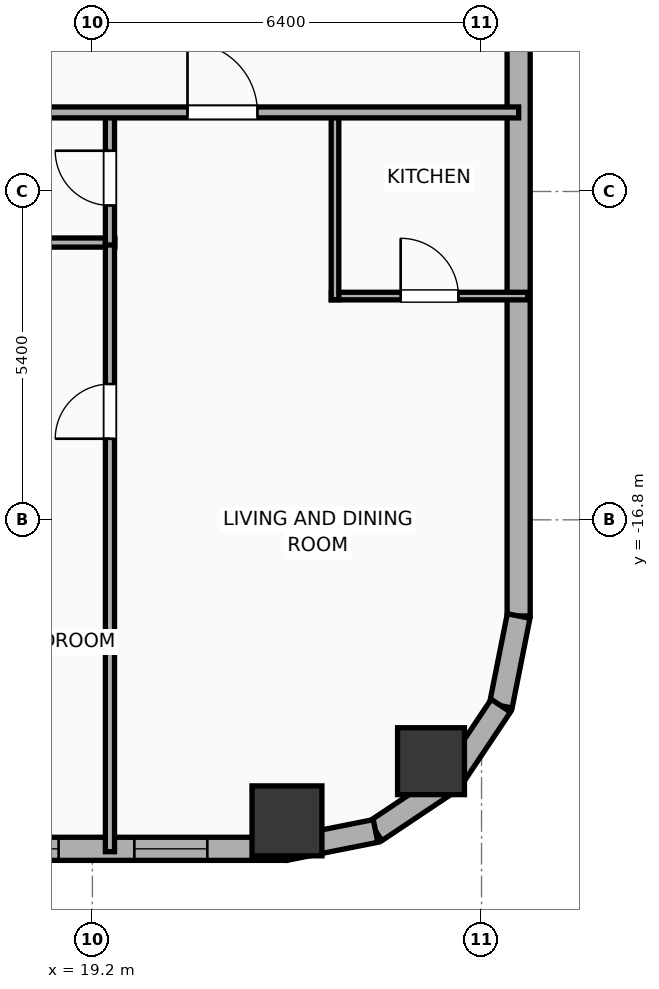
"""IFC4 building model, lengths in metres.
Left out: names, types, materials, properties, quantities, classifications, styles, units other than length and angle.
Written with IfcOpenShell. Run it as: python <this file> out.ifc"""

import sys

from ifc_helpers import new_model, si_unit, direction, frame, frame_2d, origin, origin_2d, place, context, subcontext, project, spatial, rectangle, hollow_rectangle, hollow_circle, extrude, element, fill, save


model = new_model("IFC4")
c1 = context("Model", 3, precision=1e-05, world=origin(), true_north=direction((0.0, 1.0)))
c2 = subcontext(c1, "Body", "Model", "MODEL_VIEW")
j1 = project(units=[si_unit("LENGTHUNIT", "METRE"), si_unit("PLANEANGLEUNIT", "RADIAN")], contexts=[c1])
p1 = place(None, origin())
s1 = spatial("IfcSite", under=j1, at=p1, CompositionType="ELEMENT")
p2 = place(p1, origin())
s2 = spatial("IfcBuilding", under=s1, at=p2, CompositionType="ELEMENT")
p3 = place(p2, frame((0.0, 0.0, 37.7)))
s3 = spatial("IfcBuildingStorey", under=s2, at=p3, CompositionType="ELEMENT", Elevation=37.7)
p4 = place(p3, frame((22.4, -21.75, 0.0), z_axis=(0.0, 0.0, 1.0), x_axis=(1.0, 0.0, 0.0)))
e1 = element("IfcColumn", 1, at=p4, inside=s3, PredefinedType="COLUMN", context=c2, shape_type="SweptSolid", body=[
    extrude(hollow_rectangle(XDim=1.15, YDim=1.15, WallThickness=0.04, at=origin_2d()), origin(), (0.0, 0.0, 1.0), 3.9),
])
p5 = place(p3, frame((24.769, -20.769, 0.0), z_axis=(0.0, 0.0, 1.0), x_axis=(1.0, 0.0, 0.0)))
e2 = element("IfcColumn", 2, at=p5, inside=s3, PredefinedType="COLUMN", context=c2, shape_type="SweptSolid", body=[
    extrude(hollow_circle(Radius=0.55, WallThickness=0.036, at=origin_2d()), origin(), (0.0, 0.0, 1.0), 3.9),
])
p6 = place(p3, frame((22.381, -22.21, 0.0), z_axis=(0.0, 0.0, 1.0), x_axis=(-1.0, 0.0, 0.0)))
e3 = element("IfcWall", 3, at=p6, inside=s3, PredefinedType="ELEMENTEDWALL", context=c2, shape_type="SweptSolid", body=[
    extrude(rectangle(XDim=51.963, YDim=0.38, at=frame_2d((25.981, 0.0))), origin(), (0.0, 0.0, 1.0), 3.65),
])
p7 = place(p6, frame((42.952, 0.0, 0.75)))
e4 = element("IfcOpeningElement", 4, at=p7, cuts=e3, PredefinedType="OPENING", context=c2, shape_type="SweptSolid", body=[
    extrude(rectangle(XDim=2.4, YDim=2.1, at=frame_2d((1.2, 1.05))), frame((0.0, 0.2, 0.0), z_axis=(0.0, -1.0, 0.0), x_axis=(1.0, 0.0, 0.0)), (0.0, 0.0, 1.0), 0.4),
])
p8 = place(p6, frame((49.847, 0.0, 0.75)))
e5 = element("IfcOpeningElement", 5, at=p8, cuts=e3, PredefinedType="OPENING", context=c2, shape_type="SweptSolid", body=[
    extrude(rectangle(XDim=1.2, YDim=2.05, at=frame_2d((0.6, 1.025))), frame((0.0, 0.2, 0.0), z_axis=(0.0, -1.0, 0.0), x_axis=(1.0, 0.0, 0.0)), (0.0, 0.0, 1.0), 0.4),
])
p9 = place(p6, frame((47.445, 0.0, 0.75)))
e6 = element("IfcOpeningElement", 6, at=p9, cuts=e3, PredefinedType="OPENING", context=c2, shape_type="SweptSolid", body=[
    extrude(rectangle(XDim=1.2, YDim=2.05, at=frame_2d((0.6, 1.025))), frame((0.0, 0.2, 0.0), z_axis=(0.0, -1.0, 0.0), x_axis=(1.0, 0.0, 0.0)), (0.0, 0.0, 1.0), 0.4),
])
p10 = place(p6, frame((39.526, 0.0, 0.75)))
e7 = element("IfcOpeningElement", 7, at=p10, cuts=e3, PredefinedType="OPENING", context=c2, shape_type="SweptSolid", body=[
    extrude(rectangle(XDim=1.2, YDim=2.05, at=frame_2d((0.6, 1.025))), frame((0.0, 0.2, 0.0), z_axis=(0.0, -1.0, 0.0), x_axis=(1.0, 0.0, 0.0)), (0.0, 0.0, 1.0), 0.4),
])
p11 = place(p6, frame((33.018, 0.0, 0.75)))
e8 = element("IfcOpeningElement", 8, at=p11, cuts=e3, PredefinedType="OPENING", context=c2, shape_type="SweptSolid", body=[
    extrude(rectangle(XDim=1.2, YDim=2.05, at=frame_2d((0.6, 1.025))), frame((0.0, 0.2, 0.0), z_axis=(0.0, -1.0, 0.0), x_axis=(1.0, 0.0, 0.0)), (0.0, 0.0, 1.0), 0.4),
])
p12 = place(p6, frame((36.813, 0.0, 0.75)))
e9 = element("IfcOpeningElement", 9, at=p12, cuts=e3, PredefinedType="OPENING", context=c2, shape_type="SweptSolid", body=[
    extrude(rectangle(XDim=1.2, YDim=2.05, at=frame_2d((0.6, 1.025))), frame((0.0, 0.2, 0.0), z_axis=(0.0, -1.0, 0.0), x_axis=(1.0, 0.0, 0.0)), (0.0, 0.0, 1.0), 0.4),
])
p13 = place(p6, frame((28.886, 0.0, 0.75)))
e10 = element("IfcOpeningElement", 10, at=p13, cuts=e3, PredefinedType="OPENING", context=c2, shape_type="SweptSolid", body=[
    extrude(rectangle(XDim=1.2, YDim=2.05, at=frame_2d((0.6, 1.025))), frame((0.0, 0.2, 0.0), z_axis=(0.0, -1.0, 0.0), x_axis=(1.0, 0.0, 0.0)), (0.0, 0.0, 1.0), 0.4),
])
p14 = place(p6, frame((23.306, 0.0, 0.75)))
e11 = element("IfcOpeningElement", 11, at=p14, cuts=e3, PredefinedType="OPENING", context=c2, shape_type="SweptSolid", body=[
    extrude(rectangle(XDim=1.2, YDim=2.05, at=frame_2d((0.6, 1.025))), frame((0.0, 0.2, 0.0), z_axis=(0.0, -1.0, 0.0), x_axis=(1.0, 0.0, 0.0)), (0.0, 0.0, 1.0), 0.4),
])
p15 = place(p6, frame((26.056, 0.0, 0.75)))
e12 = element("IfcOpeningElement", 12, at=p15, cuts=e3, PredefinedType="OPENING", context=c2, shape_type="SweptSolid", body=[
    extrude(rectangle(XDim=1.2, YDim=2.05, at=frame_2d((0.6, 1.025))), frame((0.0, 0.2, 0.0), z_axis=(0.0, -1.0, 0.0), x_axis=(1.0, 0.0, 0.0)), (0.0, 0.0, 1.0), 0.4),
])
p16 = place(p6, frame((18.811, 0.0, 0.75)))
e13 = element("IfcOpeningElement", 13, at=p16, cuts=e3, PredefinedType="OPENING", context=c2, shape_type="SweptSolid", body=[
    extrude(rectangle(XDim=1.2, YDim=2.05, at=frame_2d((0.6, 1.025))), frame((0.0, 0.2, 0.0), z_axis=(0.0, -1.0, 0.0), x_axis=(1.0, 0.0, 0.0)), (0.0, 0.0, 1.0), 0.4),
])
p17 = place(p6, frame((14.602, 0.0, 0.75)))
e14 = element("IfcOpeningElement", 14, at=p17, cuts=e3, PredefinedType="OPENING", context=c2, shape_type="SweptSolid", body=[
    extrude(rectangle(XDim=1.2, YDim=2.05, at=frame_2d((0.6, 1.025))), frame((0.0, 0.2, 0.0), z_axis=(0.0, -1.0, 0.0), x_axis=(1.0, 0.0, 0.0)), (0.0, 0.0, 1.0), 0.4),
])
p18 = place(p6, frame((11.852, 0.0, 0.75)))
e15 = element("IfcOpeningElement", 15, at=p18, cuts=e3, PredefinedType="OPENING", context=c2, shape_type="SweptSolid", body=[
    extrude(rectangle(XDim=1.2, YDim=2.05, at=frame_2d((0.6, 1.025))), frame((0.0, 0.2, 0.0), z_axis=(0.0, -1.0, 0.0), x_axis=(1.0, 0.0, 0.0)), (0.0, 0.0, 1.0), 0.4),
])
p19 = place(p6, frame((8.316, 0.0, 0.75)))
e16 = element("IfcOpeningElement", 16, at=p19, cuts=e3, PredefinedType="OPENING", context=c2, shape_type="SweptSolid", body=[
    extrude(rectangle(XDim=1.2, YDim=2.05, at=frame_2d((0.6, 1.025))), frame((0.0, 0.2, 0.0), z_axis=(0.0, -1.0, 0.0), x_axis=(1.0, 0.0, 0.0)), (0.0, 0.0, 1.0), 0.4),
])
p20 = place(p6, frame((6.286, 0.0, 0.75)))
e17 = element("IfcOpeningElement", 17, at=p20, cuts=e3, PredefinedType="OPENING", context=c2, shape_type="SweptSolid", body=[
    extrude(rectangle(XDim=1.2, YDim=2.05, at=frame_2d((0.6, 1.025))), frame((0.0, 0.2, 0.0), z_axis=(0.0, -1.0, 0.0), x_axis=(1.0, 0.0, 0.0)), (0.0, 0.0, 1.0), 0.4),
])
p21 = place(p6, frame((3.737, 0.0, 0.75)))
e18 = element("IfcOpeningElement", 18, at=p21, cuts=e3, PredefinedType="OPENING", context=c2, shape_type="SweptSolid", body=[
    extrude(rectangle(XDim=1.2, YDim=2.05, at=frame_2d((0.6, 1.025))), frame((0.0, 0.2, 0.0), z_axis=(0.0, -1.0, 0.0), x_axis=(1.0, 0.0, 0.0)), (0.0, 0.0, 1.0), 0.4),
])
p22 = place(p6, frame((1.291, 0.0, 0.75)))
e19 = element("IfcOpeningElement", 19, at=p22, cuts=e3, PredefinedType="OPENING", context=c2, shape_type="SweptSolid", body=[
    extrude(rectangle(XDim=1.2, YDim=2.05, at=frame_2d((0.6, 1.025))), frame((0.0, 0.2, 0.0), z_axis=(0.0, -1.0, 0.0), x_axis=(1.0, 0.0, 0.0)), (0.0, 0.0, 1.0), 0.4),
])
p23 = place(p3, frame((26.21, 18.381, 0.0), z_axis=(0.0, 0.0, 1.0), x_axis=(0.0, -1.0, 0.0)))
e20 = element("IfcWall", 20, at=p23, inside=s3, PredefinedType="ELEMENTEDWALL", context=c2, shape_type="SweptSolid", body=[
    extrude(rectangle(XDim=36.763, YDim=0.38, at=frame_2d((18.381, 0.0))), origin(), (0.0, 0.0, 1.0), 3.65),
])
p24 = place(p3, frame((26.21, -18.381, 0.0), z_axis=(0.0, 0.0, 1.0), x_axis=(-0.195086038585, -0.980786132421, 0.0)))
e21 = element("IfcWall", 21, at=p24, inside=s3, PredefinedType="ELEMENTEDWALL", context=c2, shape_type="SweptSolid", body=[
    extrude(rectangle(XDim=1.504, YDim=0.38, at=frame_2d((0.752, 0.0))), origin(), (0.0, 0.0, 1.0), 3.65),
])
for number, where, z_axis, x_axis in (
    (22, (25.917, -19.857, 0.0), (0.0, 0.0, 1.0), (-0.556, -0.831, 0.0)),
    (23, (25.091, -21.091, 0.0), (0.0, 0.0, 1.0), (-0.831, -0.556, 0.0)),
):
    element("IfcWall", number, at=place(p3, frame(where, z_axis=z_axis, x_axis=x_axis)), inside=s3, PredefinedType="ELEMENTEDWALL", context=c2, shape_type="SweptSolid", body=[
        extrude(rectangle(XDim=1.485, YDim=0.38, at=frame_2d((0.743, 0.0))), origin(), (0.0, 0.0, 1.0), 3.65),
    ])
p25 = place(p3, frame((23.857, -21.917, 0.0), z_axis=(0.0, 0.0, 1.0), x_axis=(-0.980786132421, -0.195086038585, 0.0)))
e24 = element("IfcWall", 24, at=p25, inside=s3, PredefinedType="ELEMENTEDWALL", context=c2, shape_type="SweptSolid", body=[
    extrude(rectangle(XDim=1.504, YDim=0.38, at=frame_2d((0.752, 0.0))), origin(), (0.0, 0.0, 1.0), 3.65),
])
p26 = place(p3, frame((16.34, -12.24, 0.0), z_axis=(0.0, 0.0, 1.0), x_axis=(1.0, 0.0, 0.0)))
e25 = element("IfcWall", 25, at=p26, inside=s3, PredefinedType="PLUMBINGWALL", context=c2, shape_type="SweptSolid", body=[
    extrude(rectangle(XDim=3.229, YDim=0.15, at=frame_2d((1.615, 0.0))), origin(), (0.0, 0.0, 1.0), 3.65),
])
p27 = place(p3, frame((19.489, -22.258, 0.0), z_axis=(0.0, 0.0, 1.0), x_axis=(0.0, 1.0, 0.0)))
e26 = element("IfcWall", 26, at=p27, inside=s3, PredefinedType="PLUMBINGWALL", context=c2, shape_type="SweptSolid", body=[
    extrude(rectangle(XDim=10.058, YDim=0.15, at=frame_2d((5.029, 0.0))), origin(), (0.0, 0.0, 1.0), 3.65),
])
p28 = place(p27, frame((6.792, 0.0, 0.0)))
e27 = element("IfcOpeningElement", 27, at=p28, cuts=e26, PredefinedType="OPENING", context=c2, shape_type="SweptSolid", body=[
    extrude(rectangle(XDim=0.9, YDim=2.05, at=frame_2d((0.45, 1.025))), frame((0.0, 0.085, 0.0), z_axis=(0.0, -1.0, 0.0), x_axis=(1.0, 0.0, 0.0)), (0.0, 0.0, 1.0), 0.17),
])
p29 = place(p3, frame((19.489, -12.28, 0.0), z_axis=(0.0, 0.0, 1.0), x_axis=(0.0, 1.0, 0.0)))
e28 = element("IfcWall", 28, at=p29, inside=s3, PredefinedType="PLUMBINGWALL", context=c2, shape_type="SweptSolid", body=[
    extrude(rectangle(XDim=2.2, YDim=0.15, at=frame_2d((1.1, 0.0))), origin(), (0.0, 0.0, 1.0), 3.65),
])
p30 = place(p29, frame((0.65, 0.0, 0.0)))
e29 = element("IfcOpeningElement", 29, at=p30, cuts=e28, PredefinedType="OPENING", context=c2, shape_type="SweptSolid", body=[
    extrude(rectangle(XDim=0.9, YDim=2.05, at=frame_2d((0.45, 1.025))), frame((0.0, 0.085, 0.0), z_axis=(0.0, -1.0, 0.0), x_axis=(1.0, 0.0, 0.0)), (0.0, 0.0, 1.0), 0.17),
])
p31 = place(p3, frame((23.13, -13.12, 0.0), z_axis=(0.0, 0.0, 1.0), x_axis=(1.0, 0.0, 0.0)))
e30 = element("IfcWall", 30, at=p31, inside=s3, PredefinedType="PARTITIONING", context=c2, shape_type="SweptSolid", body=[
    extrude(rectangle(XDim=3.23, YDim=0.125, at=frame_2d((1.615, 0.0))), origin(), (0.0, 0.0, 1.0), 3.65),
])
p32 = place(p31, frame((1.14, 0.0, 0.0)))
e31 = element("IfcOpeningElement", 31, at=p32, cuts=e30, PredefinedType="OPENING", context=c2, shape_type="SweptSolid", body=[
    extrude(rectangle(XDim=0.95, YDim=2.05, at=frame_2d((0.475, 1.025))), frame((0.0, 0.073, 0.0), z_axis=(0.0, -1.0, 0.0), x_axis=(1.0, 0.0, 0.0)), (0.0, 0.0, 1.0), 0.145),
])
p33 = place(p3, frame((23.19, -13.18, 0.0), z_axis=(0.0, 0.0, 1.0), x_axis=(0.0, 1.0, 0.0)))
e32 = element("IfcWall", 32, at=p33, inside=s3, PredefinedType="PARTITIONING", context=c2, shape_type="SweptSolid", body=[
    extrude(rectangle(XDim=3.1, YDim=0.125, at=frame_2d((1.55, 0.0))), origin(), (0.0, 0.0, 1.0), 3.65),
])
p34 = place(p3, frame((-33.41, -10.1, 0.0), z_axis=(0.0, 0.0, 1.0), x_axis=(1.0, 0.0, 0.0)))
e33 = element("IfcWall", 33, at=p34, inside=s3, PredefinedType="PARTITIONING", context=c2, shape_type="SweptSolid", body=[
    extrude(rectangle(XDim=59.62, YDim=0.18, at=frame_2d((29.81, 0.0))), origin(), (0.0, 0.0, 1.0), 3.65),
])
p35 = place(p34, frame((2.746, 0.0, 0.0)))
e34 = element("IfcOpeningElement", 34, at=p35, cuts=e33, PredefinedType="OPENING", context=c2, shape_type="SweptSolid", body=[
    extrude(rectangle(XDim=0.9, YDim=2.05, at=frame_2d((0.45, 1.025))), frame((0.0, 0.1, 0.0), z_axis=(0.0, -1.0, 0.0), x_axis=(1.0, 0.0, 0.0)), (0.0, 0.0, 1.0), 0.2),
])
p36 = place(p34, frame((11.552, 0.0, 0.0)))
e35 = element("IfcOpeningElement", 35, at=p36, cuts=e33, PredefinedType="OPENING", context=c2, shape_type="SweptSolid", body=[
    extrude(rectangle(XDim=1.15, YDim=2.05, at=frame_2d((0.575, 1.025))), frame((0.0, 0.1, 0.0), z_axis=(0.0, -1.0, 0.0), x_axis=(1.0, 0.0, 0.0)), (0.0, 0.0, 1.0), 0.2),
])
p37 = place(p34, frame((22.379, 0.0, 0.0)))
e36 = element("IfcOpeningElement", 36, at=p37, cuts=e33, PredefinedType="OPENING", context=c2, shape_type="SweptSolid", body=[
    extrude(rectangle(XDim=1.15, YDim=2.05, at=frame_2d((0.575, 1.025))), frame((0.0, 0.1, 0.0), z_axis=(0.0, -1.0, 0.0), x_axis=(1.0, 0.0, 0.0)), (0.0, 0.0, 1.0), 0.2),
])
p38 = place(p34, frame((31.28, 0.0, 0.0)))
e37 = element("IfcOpeningElement", 37, at=p38, cuts=e33, PredefinedType="OPENING", context=c2, shape_type="SweptSolid", body=[
    extrude(rectangle(XDim=1.15, YDim=2.05, at=frame_2d((0.575, 1.025))), frame((0.0, 0.1, 0.0), z_axis=(0.0, -1.0, 0.0), x_axis=(1.0, 0.0, 0.0)), (0.0, 0.0, 1.0), 0.2),
])
p39 = place(p34, frame((36.02, 0.0, 0.0)))
e38 = element("IfcOpeningElement", 38, at=p39, cuts=e33, PredefinedType="OPENING", context=c2, shape_type="SweptSolid", body=[
    extrude(rectangle(XDim=0.9, YDim=2.05, at=frame_2d((0.45, 1.025))), frame((0.0, 0.1, 0.0), z_axis=(0.0, -1.0, 0.0), x_axis=(1.0, 0.0, 0.0)), (0.0, 0.0, 1.0), 0.2),
])
p40 = place(p34, frame((40.044, 0.0, 0.0)))
e39 = element("IfcOpeningElement", 39, at=p40, cuts=e33, PredefinedType="OPENING", context=c2, shape_type="SweptSolid", body=[
    extrude(rectangle(XDim=1.15, YDim=2.05, at=frame_2d((0.575, 1.025))), frame((0.0, 0.1, 0.0), z_axis=(0.0, -1.0, 0.0), x_axis=(1.0, 0.0, 0.0)), (0.0, 0.0, 1.0), 0.2),
])
p41 = place(p34, frame((45.613, 0.0, 0.0)))
e40 = element("IfcOpeningElement", 40, at=p41, cuts=e33, PredefinedType="OPENING", context=c2, shape_type="SweptSolid", body=[
    extrude(rectangle(XDim=1.15, YDim=2.05, at=frame_2d((0.575, 1.025))), frame((0.0, 0.1, 0.0), z_axis=(0.0, -1.0, 0.0), x_axis=(1.0, 0.0, 0.0)), (0.0, 0.0, 1.0), 0.2),
])
p42 = place(p34, frame((54.174, 0.0, 0.0)))
e41 = element("IfcOpeningElement", 41, at=p42, cuts=e33, PredefinedType="OPENING", context=c2, shape_type="SweptSolid", body=[
    extrude(rectangle(XDim=1.15, YDim=2.05, at=frame_2d((0.575, 1.025))), frame((0.0, 0.1, 0.0), z_axis=(0.0, -1.0, 0.0), x_axis=(1.0, 0.0, 0.0)), (0.0, 0.0, 1.0), 0.2),
])
p43 = place(p21, origin())
e42 = element("IfcWindow", 42, at=p43, inside=s3, PartitioningType="SINGLE_PANEL", PredefinedType="WINDOW", context=c2, shape_type="SweptSolid", body=[
    extrude(rectangle(XDim=1.2, YDim=2.05, at=frame_2d((0.6, 1.025))), frame((0.0, 0.03, 0.0), z_axis=(0.0, -1.0, 0.0), x_axis=(1.0, 0.0, 0.0)), (0.0, 0.0, 1.0), 0.06),
])
fill(e18, e42)
p44 = place(p22, origin())
e43 = element("IfcWindow", 43, at=p44, inside=s3, PartitioningType="SINGLE_PANEL", PredefinedType="WINDOW", context=c2, shape_type="SweptSolid", body=[
    extrude(rectangle(XDim=1.2, YDim=2.05, at=frame_2d((0.6, 1.025))), frame((0.0, 0.03, 0.0), z_axis=(0.0, -1.0, 0.0), x_axis=(1.0, 0.0, 0.0)), (0.0, 0.0, 1.0), 0.06),
])
fill(e19, e43)
p45 = place(p28, origin())
e44 = element("IfcDoor", 44, at=p45, inside=s3, OperationType="SINGLE_SWING_LEFT", PredefinedType="DOOR", context=c2, shape_type="SweptSolid", body=[
    extrude(rectangle(XDim=0.9, YDim=2.05, at=frame_2d((0.45, 1.025))), frame((0.0, 0.025, 0.0), z_axis=(0.0, -1.0, 0.0), x_axis=(1.0, 0.0, 0.0)), (0.0, 0.0, 1.0), 0.05),
])
fill(e27, e44)
p46 = place(p30, origin())
e45 = element("IfcDoor", 45, at=p46, inside=s3, OperationType="SINGLE_SWING_RIGHT", PredefinedType="DOOR", context=c2, shape_type="SweptSolid", body=[
    extrude(rectangle(XDim=0.9, YDim=2.05, at=frame_2d((0.45, 1.025))), frame((0.0, 0.025, 0.0), z_axis=(0.0, -1.0, 0.0), x_axis=(1.0, 0.0, 0.0)), (0.0, 0.0, 1.0), 0.05),
])
fill(e29, e45)
p47 = place(p32, origin())
e46 = element("IfcDoor", 46, at=p47, inside=s3, OperationType="SINGLE_SWING_LEFT", PredefinedType="DOOR", context=c2, shape_type="SweptSolid", body=[
    extrude(rectangle(XDim=0.95, YDim=2.05, at=frame_2d((0.475, 1.025))), frame((0.0, 0.025, 0.0), z_axis=(0.0, -1.0, 0.0), x_axis=(1.0, 0.0, 0.0)), (0.0, 0.0, 1.0), 0.05),
])
fill(e31, e46)
p48 = place(p42, origin())
e47 = element("IfcDoor", 47, at=p48, inside=s3, OperationType="SINGLE_SWING_LEFT", PredefinedType="DOOR", context=c2, shape_type="SweptSolid", body=[
    extrude(rectangle(XDim=1.15, YDim=2.05, at=frame_2d((0.575, 1.025))), frame((0.0, 0.025, 0.0), z_axis=(0.0, -1.0, 0.0), x_axis=(1.0, 0.0, 0.0)), (0.0, 0.0, 1.0), 0.05),
])
fill(e41, e47)
save(model, sys.argv[1])
